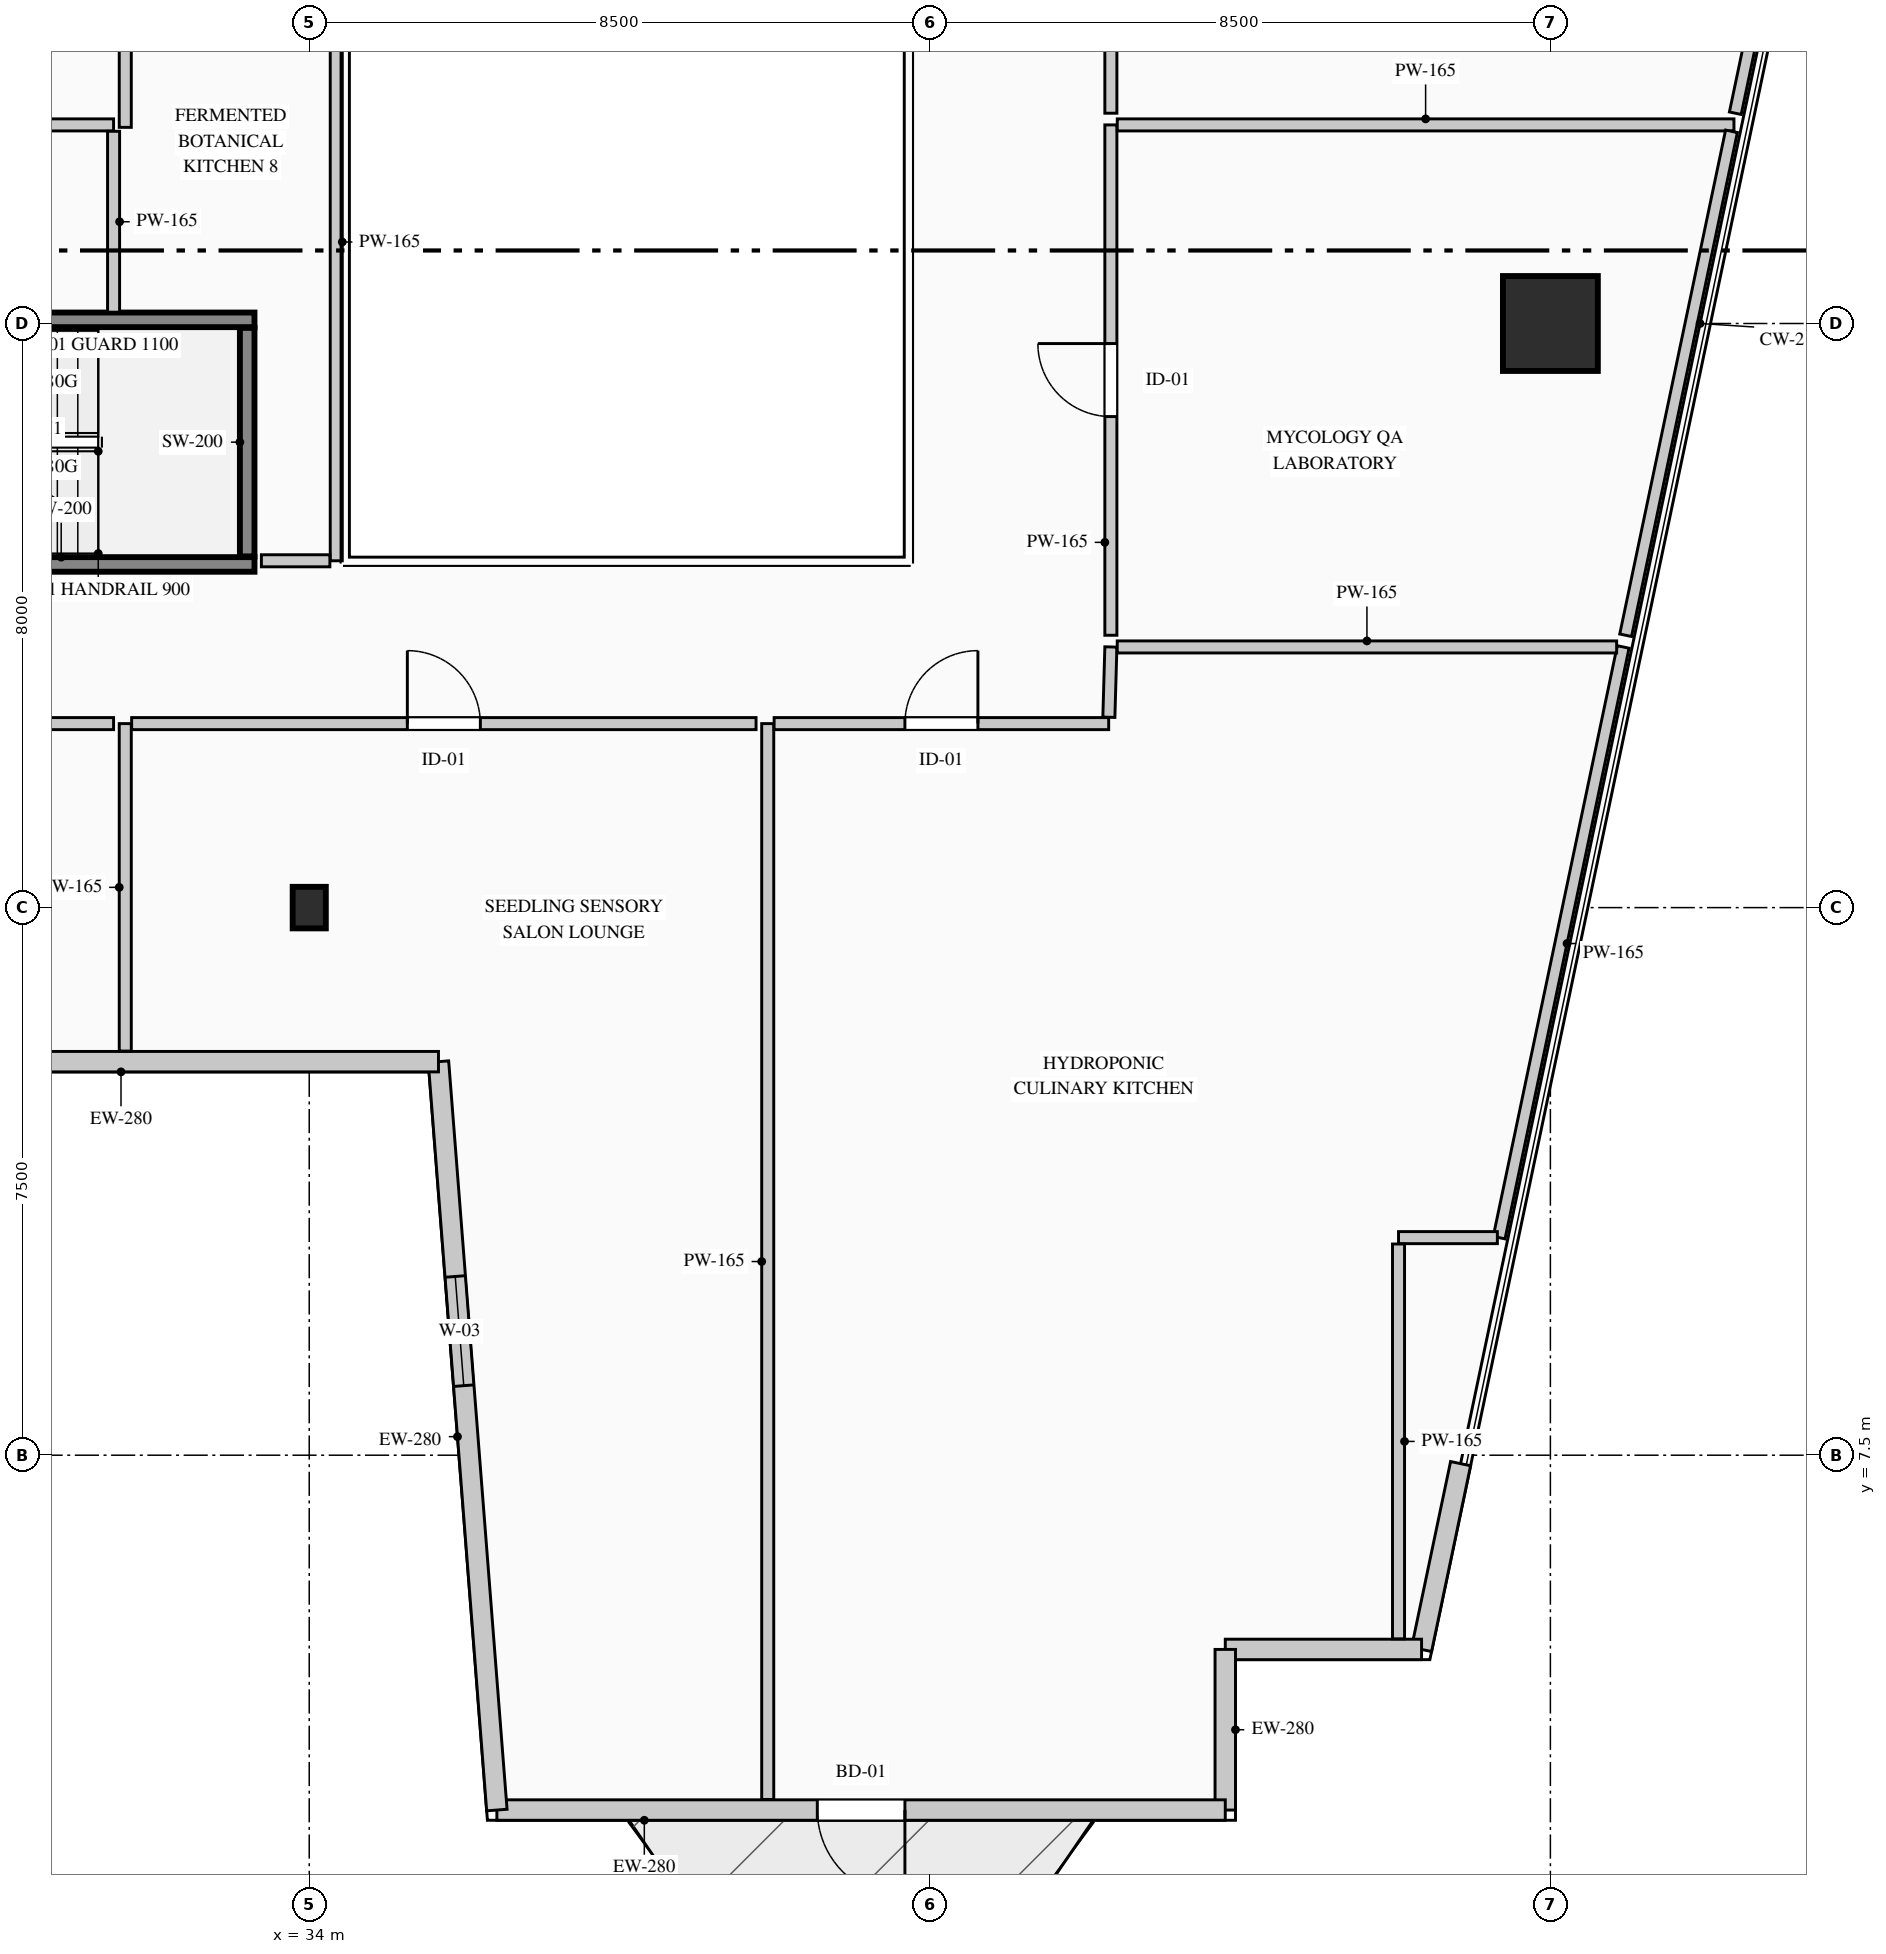
"""IFC4 building model, lengths in metres.
Left out: names, types, materials, properties, quantities, classifications, styles, units other than length and angle.
Written with IfcOpenShell. Run it as: python <this file> out.ifc"""

import sys

from ifc_helpers import new_model, si_unit, direction, frame, frame_2d, origin, origin_2d, place, context, subcontext, project, spatial, rectangle, i_section, extrude, element, fill, save


model = new_model("IFC4")
c1 = context("Model", 3, precision=1e-05, world=origin(), true_north=direction((0.0, 1.0)))
c2 = subcontext(c1, "Body", "Model", "MODEL_VIEW")
j1 = project(units=[si_unit("LENGTHUNIT", "METRE"), si_unit("PLANEANGLEUNIT", "RADIAN")], contexts=[c1])
p1 = place(None, origin())
s1 = spatial("IfcSite", under=j1, at=p1, CompositionType="ELEMENT")
p2 = place(p1, origin())
s2 = spatial("IfcBuilding", under=s1, at=p2, CompositionType="ELEMENT")
p3 = place(p2, frame((0.0, 0.0, 62.2)))
s3 = spatial("IfcBuildingStorey", under=s2, at=p3, CompositionType="ELEMENT", Elevation=62.2)
p4 = place(p3, frame((26.05, 19.7, 0.0), z_axis=(0.0, 0.0, 1.0), x_axis=(1.0, 0.0, 0.0)))
e1 = element("IfcWall", 1, at=p4, inside=s3, PredefinedType="SHEAR", context=c2, shape_type="SweptSolid", body=[
    extrude(rectangle(XDim=7.2, YDim=0.2, at=frame_2d((3.6, 0.0))), origin(), (0.0, 0.0, 1.0), 4.4),
])
p5 = place(p4, frame((0.38, 0.0, 0.0)))
e2 = element("IfcOpeningElement", 2, at=p5, cuts=e1, PredefinedType="OPENING", context=c2, shape_type="SweptSolid", body=[
    extrude(rectangle(XDim=1.15, YDim=2.2, at=frame_2d((0.575, 1.1))), frame((0.0, 0.11, 0.0), z_axis=(0.0, -1.0, 0.0), x_axis=(1.0, 0.0, 0.0)), (0.0, 0.0, 1.0), 0.22),
])
p6 = place(p3, frame((26.05, 23.05, 0.0), z_axis=(0.0, 0.0, 1.0), x_axis=(1.0, 0.0, 0.0)))
e3 = element("IfcWall", 3, at=p6, inside=s3, PredefinedType="SHEAR", context=c2, shape_type="SweptSolid", body=[
    extrude(rectangle(XDim=7.2, YDim=0.2, at=frame_2d((3.6, 0.0))), origin(), (0.0, 0.0, 1.0), 4.4),
])
p7 = place(p3, frame((33.15, 19.81, 0.0), z_axis=(0.0, 0.0, 1.0), x_axis=(0.0, 1.0, 0.0)))
e4 = element("IfcWall", 4, at=p7, inside=s3, PredefinedType="SHEAR", context=c2, shape_type="SweptSolid", body=[
    extrude(rectangle(XDim=3.13, YDim=0.2, at=frame_2d((1.565, 0.0))), origin(), (0.0, 0.0, 1.0), 4.4),
])
p8 = place(p3, frame((34.0, 15.0, 0.0), z_axis=(0.0, 0.0, 1.0), x_axis=(1.0, 0.0, 0.0)))
e5 = element("IfcColumn", 5, at=p8, inside=s3, PredefinedType="COLUMN", context=c2, shape_type="SweptSolid", body=[
    extrude(i_section(OverallWidth=0.454, OverallDepth=0.569, WebThickness=0.078, FlangeThickness=0.08, FilletRadius=0.015, at=origin_2d()), origin(), (0.0, 0.0, 1.0), 4.4),
])
p9 = place(p3, frame((51.0, 23.0, 0.0), z_axis=(0.0, 0.0, 1.0), x_axis=(1.0, 0.0, 0.0)))
e6 = element("IfcColumn", 6, at=p9, inside=s3, PredefinedType="COLUMN", context=c2, shape_type="SweptSolid", body=[
    extrude(rectangle(XDim=1.3, YDim=1.3, at=origin_2d()), origin(), (0.0, 0.0, 1.0), 4.4),
])
p10 = place(p3, frame((49.77, 7.385, 0.0), z_axis=(0.0, 0.0, 1.0), x_axis=(-0.205551409765, -0.978646319128, 0.0)))
e7 = element("IfcWall", 7, at=p10, inside=s3, PredefinedType="STANDARD", context=c2, shape_type="SweptSolid", body=[
    extrude(rectangle(XDim=2.6, YDim=0.28, at=frame_2d((1.3, 0.0))), origin(), (0.0, 0.0, 1.0), 4.1),
])
p11 = place(p3, frame((49.236, 4.84, 0.0), z_axis=(0.0, 0.0, 1.0), x_axis=(-1.0, 0.0, 0.0)))
e8 = element("IfcWall", 8, at=p11, inside=s3, PredefinedType="STANDARD", context=c2, shape_type="SweptSolid", body=[
    extrude(rectangle(XDim=2.688, YDim=0.28, at=frame_2d((1.344, 0.0))), origin(), (0.0, 0.0, 1.0), 4.1),
])
p12 = place(p3, frame((46.547, 4.84, 0.0), z_axis=(0.0, 0.0, 1.0), x_axis=(0.0, -1.0, 0.0)))
e9 = element("IfcWall", 9, at=p12, inside=s3, PredefinedType="STANDARD", context=c2, shape_type="SweptSolid", body=[
    extrude(rectangle(XDim=2.2, YDim=0.28, at=frame_2d((1.1, 0.0))), origin(), (0.0, 0.0, 1.0), 4.1),
])
p13 = place(p3, frame((46.547, 2.64, 0.0), z_axis=(0.0, 0.0, 1.0), x_axis=(-1.0, 0.0, 0.0)))
e10 = element("IfcWall", 10, at=p13, inside=s3, PredefinedType="STANDARD", context=c2, shape_type="SweptSolid", body=[
    extrude(rectangle(XDim=9.977, YDim=0.28, at=frame_2d((4.989, 0.0))), origin(), (0.0, 0.0, 1.0), 4.1),
])
p14 = place(p13, frame((4.388, 0.0, 0.0)))
e11 = element("IfcOpeningElement", 11, at=p14, cuts=e10, PredefinedType="OPENING", context=c2, shape_type="SweptSolid", body=[
    extrude(rectangle(XDim=1.2, YDim=2.2, at=frame_2d((0.6, 1.1))), frame((0.0, 0.15, 0.0), z_axis=(0.0, -1.0, 0.0), x_axis=(1.0, 0.0, 0.0)), (0.0, 0.0, 1.0), 0.3),
])
p15 = place(p3, frame((36.57, 2.64, 0.0), z_axis=(0.0, 0.0, 1.0), x_axis=(-0.077816860153, 0.996967670627, 0.0)))
e12 = element("IfcWall", 12, at=p15, inside=s3, PredefinedType="STANDARD", context=c2, shape_type="SweptSolid", body=[
    extrude(rectangle(XDim=10.281, YDim=0.28, at=frame_2d((5.141, 0.0))), origin(), (0.0, 0.0, 1.0), 4.1),
])
p16 = place(p15, frame((5.83, 0.0, 0.9)))
e13 = element("IfcOpeningElement", 13, at=p16, cuts=e12, PredefinedType="OPENING", context=c2, shape_type="SweptSolid", body=[
    extrude(rectangle(XDim=1.5, YDim=1.8, at=frame_2d((0.75, 0.9))), frame((0.0, 0.15, 0.0), z_axis=(0.0, -1.0, 0.0), x_axis=(1.0, 0.0, 0.0)), (0.0, 0.0, 1.0), 0.3),
])
p17 = place(p3, frame((35.77, 12.89, 0.0), z_axis=(0.0, 0.0, 1.0), x_axis=(-1.0, 0.0, 0.0)))
e14 = element("IfcWall", 14, at=p17, inside=s3, PredefinedType="STANDARD", context=c2, shape_type="SweptSolid", body=[
    extrude(rectangle(XDim=8.697, YDim=0.28, at=frame_2d((4.348, 0.0))), origin(), (0.0, 0.0, 1.0), 4.1),
])
p18 = place(p17, frame((5.511, 0.0, 0.9)))
e15 = element("IfcOpeningElement", 15, at=p18, cuts=e14, PredefinedType="OPENING", context=c2, shape_type="SweptSolid", body=[
    extrude(rectangle(XDim=1.5, YDim=1.8, at=frame_2d((0.75, 0.9))), frame((0.0, 0.15, 0.0), z_axis=(0.0, -1.0, 0.0), x_axis=(1.0, 0.0, 0.0)), (0.0, 0.0, 1.0), 0.3),
])
p19 = place(p3, frame((51.997, 18.57, 0.0), z_axis=(0.0, 0.0, 1.0), x_axis=(-0.205523740085, -0.978652130362, 0.0)))
e16 = element("IfcWall", 16, at=p19, inside=s3, PredefinedType="PARTITIONING", context=c2, shape_type="SweptSolid", body=[
    extrude(rectangle(XDim=8.267, YDim=0.165, at=frame_2d((4.133, 0.0))), origin(), (0.0, 0.0, 1.0), 4.1),
])
p20 = place(p3, frame((50.274, 10.48, 0.0), z_axis=(0.0, 0.0, 1.0), x_axis=(-1.0, 0.0, 0.0)))
e17 = element("IfcWall", 17, at=p20, inside=s3, PredefinedType="PARTITIONING", context=c2, shape_type="SweptSolid", body=[
    extrude(rectangle(XDim=1.354, YDim=0.165, at=frame_2d((0.677, 0.0))), origin(), (0.0, 0.0, 1.0), 4.1),
])
p21 = place(p3, frame((48.92, 10.393, 0.0), z_axis=(0.0, 0.0, 1.0), x_axis=(0.0, -1.0, 0.0)))
e18 = element("IfcWall", 18, at=p21, inside=s3, PredefinedType="PARTITIONING", context=c2, shape_type="SweptSolid", body=[
    extrude(rectangle(XDim=5.407, YDim=0.165, at=frame_2d((2.704, 0.0))), origin(), (0.0, 0.0, 1.0), 4.1),
])
p22 = place(p3, frame((40.28, 2.785, 0.0), z_axis=(0.0, 0.0, 1.0), x_axis=(0.0, 1.0, 0.0)))
e19 = element("IfcWall", 19, at=p22, inside=s3, PredefinedType="PARTITIONING", context=c2, shape_type="SweptSolid", body=[
    extrude(rectangle(XDim=14.735, YDim=0.165, at=frame_2d((7.368, 0.0))), origin(), (0.0, 0.0, 1.0), 4.1),
])
p23 = place(p3, frame((40.367, 17.52, 0.0), z_axis=(0.0, 0.0, 1.0), x_axis=(1.0, 0.0, 0.0)))
e20 = element("IfcWall", 20, at=p23, inside=s3, PredefinedType="PARTITIONING", context=c2, shape_type="SweptSolid", body=[
    extrude(rectangle(XDim=4.583, YDim=0.165, at=frame_2d((2.291, 0.0))), origin(), (0.0, 0.0, 1.0), 4.1),
])
p24 = place(p23, frame((1.791, 0.0, 0.0)))
e21 = element("IfcOpeningElement", 21, at=p24, cuts=e20, PredefinedType="OPENING", context=c2, shape_type="SweptSolid", body=[
    extrude(rectangle(XDim=1.0, YDim=2.15, at=frame_2d((0.5, 1.075))), frame((0.0, 0.093, 0.0), z_axis=(0.0, -1.0, 0.0), x_axis=(1.0, 0.0, 0.0)), (0.0, 0.0, 1.0), 0.185),
])
p25 = place(p3, frame((44.952, 17.607, 0.0), z_axis=(0.0, 0.0, 1.0), x_axis=(0.028624859452, 0.999590224753, 0.0)))
e22 = element("IfcWall", 22, at=p25, inside=s3, PredefinedType="PARTITIONING", context=c2, shape_type="SweptSolid", body=[
    extrude(rectangle(XDim=0.964, YDim=0.165, at=frame_2d((0.482, 0.0))), origin(), (0.0, 0.0, 1.0), 4.1),
])
p26 = place(p3, frame((45.067, 18.57, 0.0), z_axis=(0.0, 0.0, 1.0), x_axis=(1.0, 0.0, 0.0)))
e23 = element("IfcWall", 23, at=p26, inside=s3, PredefinedType="PARTITIONING", context=c2, shape_type="SweptSolid", body=[
    extrude(rectangle(XDim=6.841, YDim=0.165, at=frame_2d((3.42, 0.0))), origin(), (0.0, 0.0, 1.0), 4.1),
])
p27 = place(p3, frame((31.48, 13.035, 0.0), z_axis=(0.0, 0.0, 1.0), x_axis=(0.0, 1.0, 0.0)))
e24 = element("IfcWall", 24, at=p27, inside=s3, PredefinedType="PARTITIONING", context=c2, shape_type="SweptSolid", body=[
    extrude(rectangle(XDim=4.485, YDim=0.165, at=frame_2d((2.243, 0.0))), origin(), (0.0, 0.0, 1.0), 4.1),
])
p28 = place(p3, frame((31.567, 17.52, 0.0), z_axis=(0.0, 0.0, 1.0), x_axis=(1.0, 0.0, 0.0)))
e25 = element("IfcWall", 25, at=p28, inside=s3, PredefinedType="PARTITIONING", context=c2, shape_type="SweptSolid", body=[
    extrude(rectangle(XDim=8.553, YDim=0.165, at=frame_2d((4.276, 0.0))), origin(), (0.0, 0.0, 1.0), 3.685),
])
p29 = place(p28, frame((3.776, 0.0, 0.0)))
e26 = element("IfcOpeningElement", 26, at=p29, cuts=e25, PredefinedType="OPENING", context=c2, shape_type="SweptSolid", body=[
    extrude(rectangle(XDim=1.0, YDim=2.15, at=frame_2d((0.5, 1.075))), frame((0.0, 0.093, 0.0), z_axis=(0.0, -1.0, 0.0), x_axis=(1.0, 0.0, 0.0)), (0.0, 0.0, 1.0), 0.185),
])
p30 = place(p3, frame((22.68, 17.52, 0.0), z_axis=(0.0, 0.0, 1.0), x_axis=(1.0, 0.0, 0.0)))
e27 = element("IfcWall", 27, at=p30, inside=s3, PredefinedType="PARTITIONING", context=c2, shape_type="SweptSolid", body=[
    extrude(rectangle(XDim=8.64, YDim=0.165, at=frame_2d((4.32, 0.0))), origin(), (0.0, 0.0, 1.0), 3.685),
])
p31 = place(p30, frame((3.82, 0.0, 0.0)))
e28 = element("IfcOpeningElement", 28, at=p31, cuts=e27, PredefinedType="OPENING", context=c2, shape_type="SweptSolid", body=[
    extrude(rectangle(XDim=1.0, YDim=2.15, at=frame_2d((0.5, 1.075))), frame((0.0, 0.093, 0.0), z_axis=(0.0, -1.0, 0.0), x_axis=(1.0, 0.0, 0.0)), (0.0, 0.0, 1.0), 0.185),
])
p32 = place(p3, frame((44.98, 18.73, 0.0), z_axis=(0.0, 0.0, 1.0), x_axis=(0.0, 1.0, 0.0)))
e29 = element("IfcWall", 29, at=p32, inside=s3, PredefinedType="PARTITIONING", context=c2, shape_type="SweptSolid", body=[
    extrude(rectangle(XDim=6.99, YDim=0.165, at=frame_2d((3.495, 0.0))), origin(), (0.0, 0.0, 1.0), 4.1),
])
p33 = place(p32, frame((2.995, 0.0, 0.0)))
e30 = element("IfcOpeningElement", 30, at=p33, cuts=e29, PredefinedType="OPENING", context=c2, shape_type="SweptSolid", body=[
    extrude(rectangle(XDim=1.0, YDim=2.15, at=frame_2d((0.5, 1.075))), frame((0.0, 0.093, 0.0), z_axis=(0.0, -1.0, 0.0), x_axis=(1.0, 0.0, 0.0)), (0.0, 0.0, 1.0), 0.185),
])
p34 = place(p3, frame((45.067, 25.72, 0.0), z_axis=(0.0, 0.0, 1.0), x_axis=(1.0, 0.0, 0.0)))
e31 = element("IfcWall", 31, at=p34, inside=s3, PredefinedType="PARTITIONING", context=c2, shape_type="SweptSolid", body=[
    extrude(rectangle(XDim=8.447, YDim=0.165, at=frame_2d((4.224, 0.0))), origin(), (0.0, 0.0, 1.0), 4.1),
])
p35 = place(p3, frame((53.481, 25.633, 0.0), z_axis=(0.0, 0.0, 1.0), x_axis=(-0.205539446235, -0.97864883183, 0.0)))
e32 = element("IfcWall", 32, at=p35, inside=s3, PredefinedType="PARTITIONING", context=c2, shape_type="SweptSolid", body=[
    extrude(rectangle(XDim=7.053, YDim=0.165, at=frame_2d((3.527, 0.0))), origin(), (0.0, 0.0, 1.0), 4.1),
])
p36 = place(p3, frame((22.91, 25.72, 0.0), z_axis=(0.0, 0.0, 1.0), x_axis=(1.0, 0.0, 0.0)))
e33 = element("IfcWall", 33, at=p36, inside=s3, PredefinedType="PARTITIONING", context=c2, shape_type="SweptSolid", body=[
    extrude(rectangle(XDim=8.41, YDim=0.165, at=frame_2d((4.205, 0.0))), origin(), (0.0, 0.0, 1.0), 3.685),
])
p37 = place(p3, frame((31.32, 25.633, 0.0), z_axis=(0.0, 0.0, 1.0), x_axis=(0.0, -1.0, 0.0)))
e34 = element("IfcWall", 34, at=p37, inside=s3, PredefinedType="PARTITIONING", context=c2, shape_type="SweptSolid", body=[
    extrude(rectangle(XDim=2.478, YDim=0.165, at=frame_2d((1.239, 0.0))), origin(), (0.0, 0.0, 1.0), 4.1),
])
p38 = place(p3, frame((34.37, 28.482, 0.0), z_axis=(0.0, 0.0, 1.0), x_axis=(0.0, -1.0, 0.0)))
e35 = element("IfcWall", 35, at=p38, inside=s3, PredefinedType="PARTITIONING", context=c2, shape_type="SweptSolid", body=[
    extrude(rectangle(XDim=8.732, YDim=0.165, at=frame_2d((4.366, 0.0))), origin(), (0.0, 0.0, 1.0), 4.1),
])
p39 = place(p3, frame((34.282, 19.75, 0.0), z_axis=(0.0, 0.0, 1.0), x_axis=(-1.0, 0.0, 0.0)))
e36 = element("IfcWall", 36, at=p39, inside=s3, PredefinedType="PARTITIONING", context=c2, shape_type="SweptSolid", body=[
    extrude(rectangle(XDim=0.938, YDim=0.165, at=frame_2d((0.469, 0.0))), origin(), (0.0, 0.0, 1.0), 4.1),
])
p40 = place(p3, frame((31.48, 25.686, 0.0), z_axis=(0.0, 0.0, 1.0), x_axis=(0.0, 1.0, 0.0)))
e37 = element("IfcWall", 37, at=p40, inside=s3, PredefinedType="PARTITIONING", context=c2, shape_type="SweptSolid", body=[
    extrude(rectangle(XDim=2.796, YDim=0.165, at=frame_2d((1.398, 0.0))), origin(), (0.0, 0.0, 1.0), 4.1),
])
p41 = place(p3, frame((56.194, 38.548, 0.0), z_axis=(0.0, 0.0, 1.0), x_axis=(-0.205602677483, -0.978635549636, 0.0)))
e38 = element("IfcWall", 38, at=p41, inside=s3, PredefinedType="PARTITIONING", context=c2, shape_type="SweptSolid", body=[
    extrude(rectangle(XDim=12.944, YDim=0.165, at=frame_2d((6.472, 0.0))), origin(), (0.0, 0.0, 1.0), 4.1),
])
p42 = place(p3, frame((44.98, 25.88, 0.0), z_axis=(0.0, 0.0, 1.0), x_axis=(0.0, 1.0, 0.0)))
e39 = element("IfcWall", 39, at=p42, inside=s3, PredefinedType="PARTITIONING", context=c2, shape_type="SweptSolid", body=[
    extrude(rectangle(XDim=8.15, YDim=0.165, at=frame_2d((4.075, 0.0))), origin(), (0.0, 0.0, 1.0), 3.685),
])
p43 = place(p42, frame((3.575, 0.0, 0.0)))
e40 = element("IfcOpeningElement", 40, at=p43, cuts=e39, PredefinedType="OPENING", context=c2, shape_type="SweptSolid", body=[
    extrude(rectangle(XDim=1.0, YDim=2.15, at=frame_2d((0.5, 1.075))), frame((0.0, 0.093, 0.0), z_axis=(0.0, -1.0, 0.0), x_axis=(1.0, 0.0, 0.0)), (0.0, 0.0, 1.0), 0.185),
])
p44 = place(p14, origin())
e41 = element("IfcDoor", 41, at=p44, inside=s3, OperationType="SINGLE_SWING_LEFT", PredefinedType="DOOR", context=c2, shape_type="SweptSolid", body=[
    extrude(rectangle(XDim=1.2, YDim=2.2, at=frame_2d((0.6, 1.1))), frame((0.0, 0.025, 0.0), z_axis=(0.0, -1.0, 0.0), x_axis=(1.0, 0.0, 0.0)), (0.0, 0.0, 1.0), 0.05),
])
fill(e11, e41)
p45 = place(p16, origin())
e42 = element("IfcWindow", 42, at=p45, inside=s3, PartitioningType="SINGLE_PANEL", PredefinedType="WINDOW", context=c2, shape_type="SweptSolid", body=[
    extrude(rectangle(XDim=1.5, YDim=1.8, at=frame_2d((0.75, 0.9))), frame((0.0, 0.03, 0.0), z_axis=(0.0, -1.0, 0.0), x_axis=(1.0, 0.0, 0.0)), (0.0, 0.0, 1.0), 0.06),
])
fill(e13, e42)
p46 = place(p24, origin())
e43 = element("IfcDoor", 43, at=p46, inside=s3, OperationType="SINGLE_SWING_RIGHT", PredefinedType="DOOR", context=c2, shape_type="SweptSolid", body=[
    extrude(rectangle(XDim=1.0, YDim=2.15, at=frame_2d((0.5, 1.075))), frame((0.0, 0.025, 0.0), z_axis=(0.0, -1.0, 0.0), x_axis=(1.0, 0.0, 0.0)), (0.0, 0.0, 1.0), 0.05),
])
fill(e21, e43)
p47 = place(p29, origin())
e44 = element("IfcDoor", 44, at=p47, inside=s3, OperationType="SINGLE_SWING_LEFT", PredefinedType="DOOR", context=c2, shape_type="SweptSolid", body=[
    extrude(rectangle(XDim=1.0, YDim=2.15, at=frame_2d((0.5, 1.075))), frame((0.0, 0.025, 0.0), z_axis=(0.0, -1.0, 0.0), x_axis=(1.0, 0.0, 0.0)), (0.0, 0.0, 1.0), 0.05),
])
fill(e26, e44)
p48 = place(p33, origin())
e45 = element("IfcDoor", 45, at=p48, inside=s3, OperationType="SINGLE_SWING_RIGHT", PredefinedType="DOOR", context=c2, shape_type="SweptSolid", body=[
    extrude(rectangle(XDim=1.0, YDim=2.15, at=frame_2d((0.5, 1.075))), frame((0.0, 0.025, 0.0), z_axis=(0.0, -1.0, 0.0), x_axis=(1.0, 0.0, 0.0)), (0.0, 0.0, 1.0), 0.05),
])
fill(e30, e45)
save(model, sys.argv[1])
